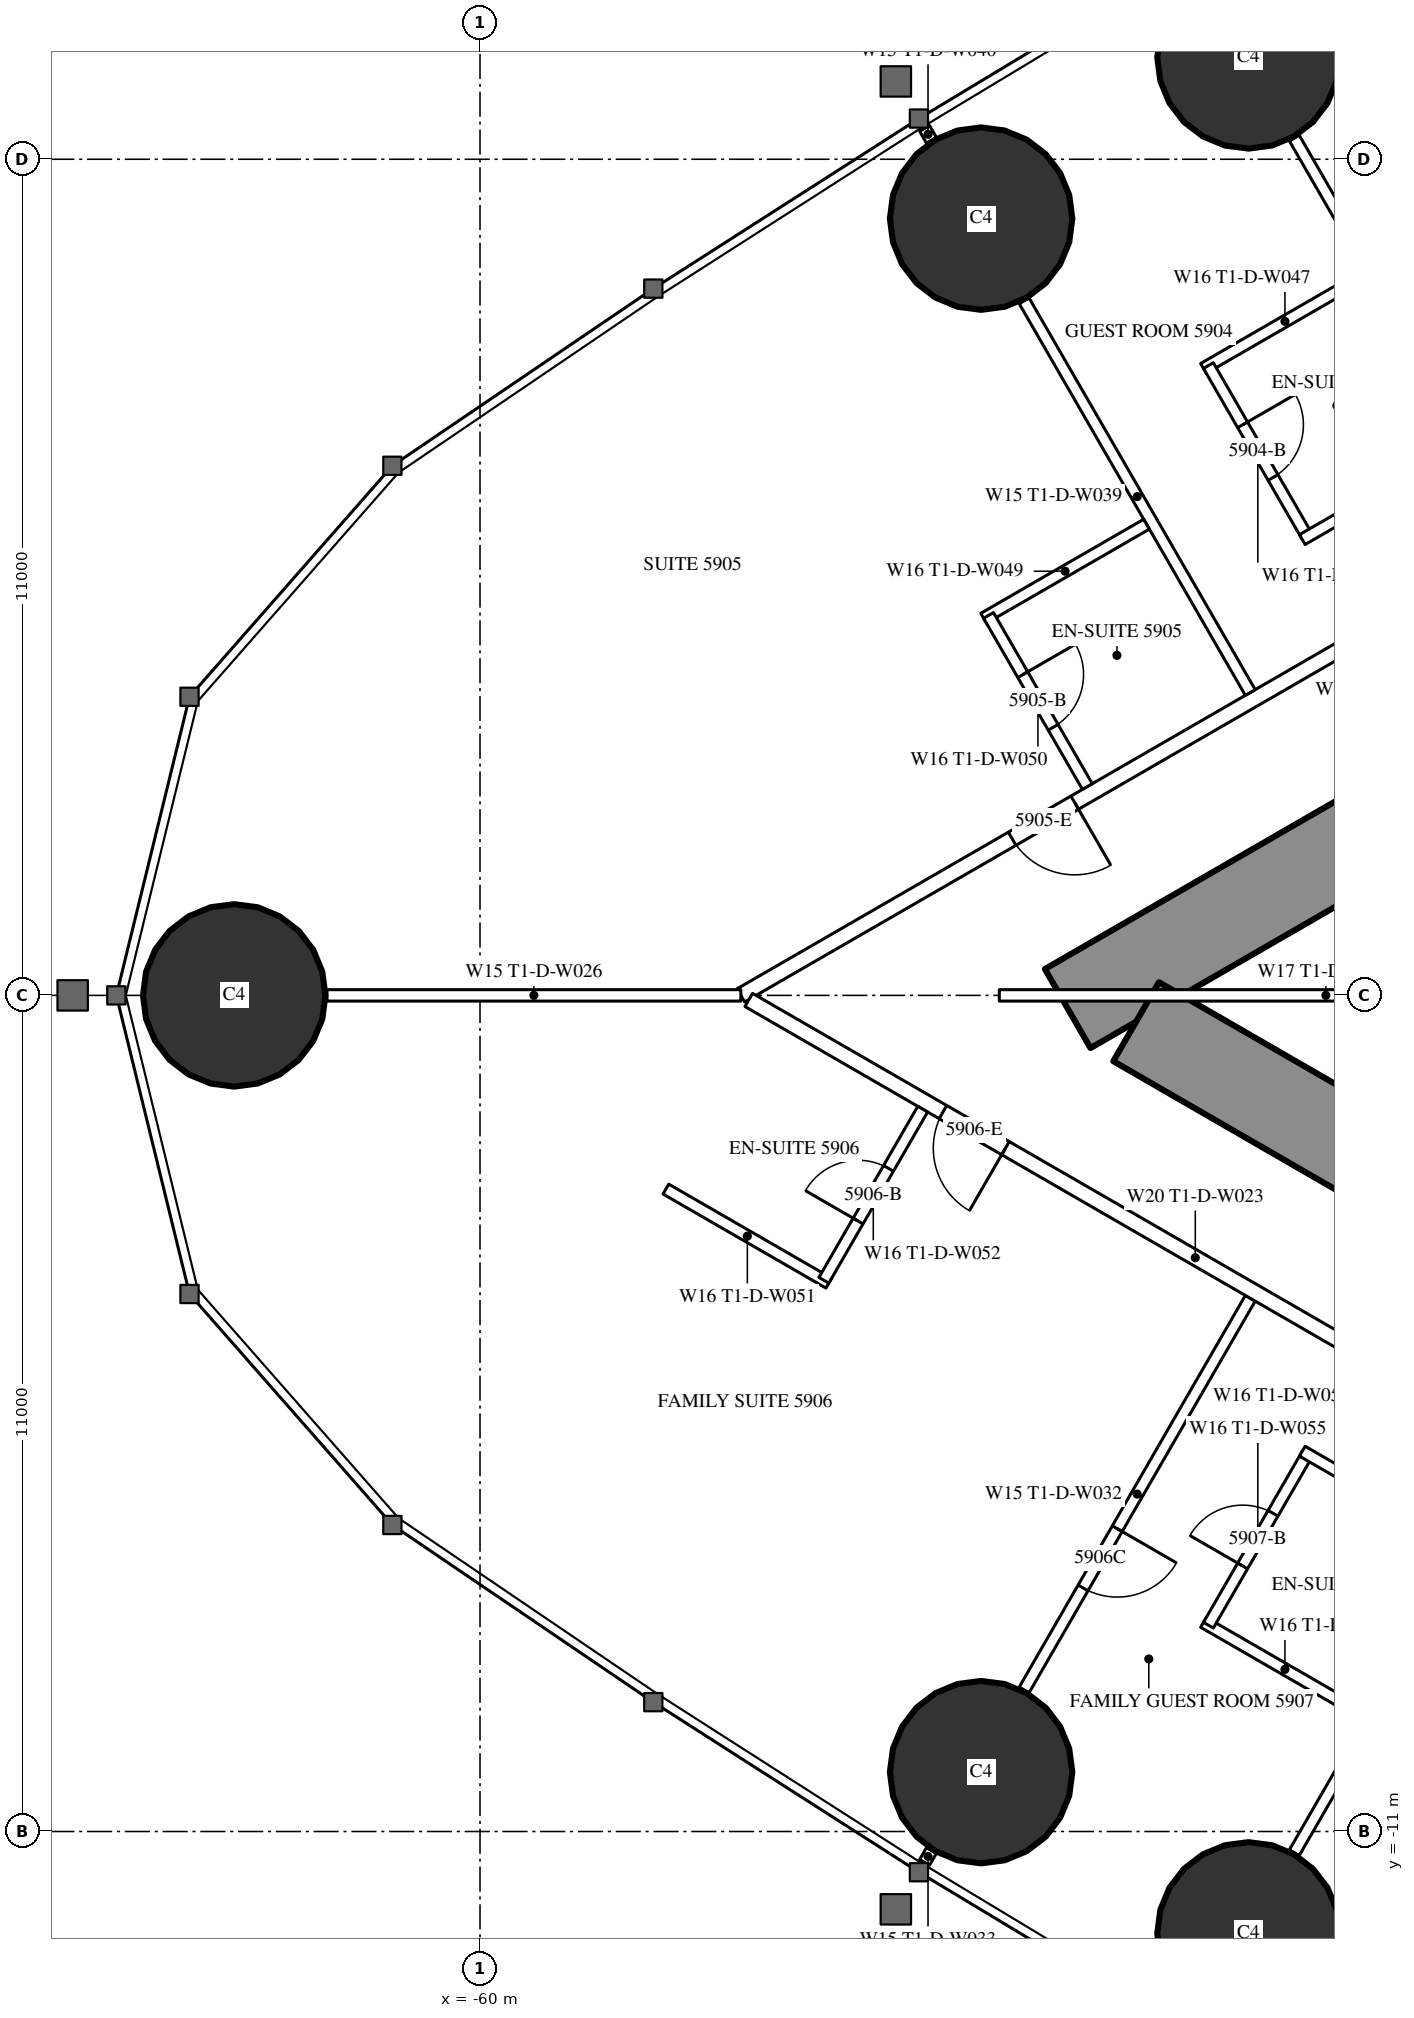
"""IFC4 building model, lengths in metres.
Left out: names, types, materials, properties, quantities, classifications, styles, units other than length and angle.
Written with IfcOpenShell. Run it as: python <this file> out.ifc"""

import sys

from ifc_helpers import new_model, si_unit, direction, frame, frame_2d, origin, origin_2d, place, context, subcontext, project, spatial, rectangle, circle, extrude, element, fill, save


model = new_model("IFC4")
c1 = context("Model", 3, precision=1e-05, world=origin(), true_north=direction((0.0, 1.0)))
c2 = subcontext(c1, "Body", "Model", "MODEL_VIEW")
j1 = project(units=[si_unit("LENGTHUNIT", "METRE"), si_unit("PLANEANGLEUNIT", "RADIAN")], contexts=[c1])
p1 = place(None, origin())
s1 = spatial("IfcSite", under=j1, at=p1, CompositionType="ELEMENT")
p2 = place(p1, origin())
s2 = spatial("IfcBuilding", under=s1, at=p2, CompositionType="ELEMENT")
p3 = place(p2, frame((0.0, 0.0, 222.5)))
s3 = spatial("IfcBuildingStorey", under=s2, at=p3, CompositionType="ELEMENT", Elevation=222.5)
for number, where, z_axis, x_axis in (
    (1, (-63.234, 0.0, 0.0), (0.0, 0.0, 1.0), (1.0, 0.0, 0.0)),
    (2, (-53.408, -10.219, 0.0), (0.0, 0.0, 1.0), (1.0, 0.0, 0.0)),
    (3, (-49.89, -12.34, 0.0), (0.0, 0.0, 1.0), (1.0, 0.0, 0.0)),
    (4, (-49.89, 12.34, 0.0), (0.0, 0.0, 1.0), (1.0, 0.0, 0.0)),
    (5, (-53.408, 10.219, 0.0), (0.0, 0.0, 1.0), (1.0, 0.0, 0.0)),
):
    element("IfcColumn", number, at=place(p3, frame(where, z_axis=z_axis, x_axis=x_axis)), inside=s3, PredefinedType="COLUMN", context=c2, shape_type="SweptSolid", body=[
        extrude(circle(Radius=1.2, at=origin_2d()), origin(), (0.0, 0.0, 1.0), 3.6),
    ])
p4 = place(p3, frame((-27.2, 14.3, 0.0), z_axis=(0.0, 0.0, 1.0), x_axis=(-0.866026593062, -0.499997940104, 0.0)))
e6 = element("IfcWall", 6, at=p4, inside=s3, PredefinedType="SHEAR", context=c2, shape_type="SweptSolid", body=[
    extrude(rectangle(XDim=28.946, YDim=1.2, at=frame_2d((14.473, 0.0))), origin(), (0.0, 0.0, 1.0), 3.6),
])
p5 = place(p4, frame((4.6, 0.0, 0.0)))
e7 = element("IfcOpeningElement", 7, at=p5, cuts=e6, PredefinedType="OPENING", context=c2, shape_type="SweptSolid", body=[
    extrude(rectangle(XDim=1.0, YDim=2.2, at=frame_2d((0.5, 1.1))), frame((0.0, 0.61, 0.0), z_axis=(0.0, -1.0, 0.0), x_axis=(1.0, 0.0, 0.0)), (0.0, 0.0, 1.0), 1.22),
])
p6 = place(p4, frame((13.395, 0.0, 0.0)))
e8 = element("IfcOpeningElement", 8, at=p6, cuts=e6, PredefinedType="OPENING", context=c2, shape_type="SweptSolid", body=[
    extrude(rectangle(XDim=1.8, YDim=2.2, at=frame_2d((0.9, 1.1))), frame((0.0, 0.61, 0.0), z_axis=(0.0, -1.0, 0.0), x_axis=(1.0, 0.0, 0.0)), (0.0, 0.0, 1.0), 1.22),
])
p7 = place(p3, frame((-27.2, -14.3, 0.0), z_axis=(0.0, 0.0, 1.0), x_axis=(-0.866024021859, 0.500002393557, 0.0)))
e9 = element("IfcWall", 9, at=p7, inside=s3, PredefinedType="SHEAR", context=c2, shape_type="SweptSolid", body=[
    extrude(rectangle(XDim=27.907, YDim=1.2, at=frame_2d((13.954, 0.0))), origin(), (0.0, 0.0, 1.0), 3.6),
])
p8 = place(p7, frame((4.6, 0.0, 0.0)))
e10 = element("IfcOpeningElement", 10, at=p8, cuts=e9, PredefinedType="OPENING", context=c2, shape_type="SweptSolid", body=[
    extrude(rectangle(XDim=1.0, YDim=2.2, at=frame_2d((0.5, 1.1))), frame((0.0, 0.61, 0.0), z_axis=(0.0, -1.0, 0.0), x_axis=(1.0, 0.0, 0.0)), (0.0, 0.0, 1.0), 1.22),
])
p9 = place(p7, frame((13.395, 0.0, 0.0)))
e11 = element("IfcOpeningElement", 11, at=p9, cuts=e9, PredefinedType="OPENING", context=c2, shape_type="SweptSolid", body=[
    extrude(rectangle(XDim=1.8, YDim=2.2, at=frame_2d((0.9, 1.1))), frame((0.0, 0.61, 0.0), z_axis=(0.0, -1.0, 0.0), x_axis=(1.0, 0.0, 0.0)), (0.0, 0.0, 1.0), 1.22),
])
p10 = place(p3, frame((-28.737, 16.068, 0.0), z_axis=(0.0, 0.0, 1.0), x_axis=(-0.866026057212, -0.499998868229, 0.0)))
e12 = element("IfcWall", 12, at=p10, inside=s3, PredefinedType="PARTITIONING", context=c2, shape_type="SweptSolid", body=[
    extrude(rectangle(XDim=32.137, YDim=0.2, at=frame_2d((16.068, 0.0))), origin(), (0.0, 0.0, 1.0), 3.35),
])
p11 = place(p10, frame((1.08, 0.0, 0.0)))
e13 = element("IfcOpeningElement", 13, at=p11, cuts=e12, PredefinedType="OPENING", context=c2, shape_type="SweptSolid", body=[
    extrude(rectangle(XDim=1.8, YDim=2.03, at=frame_2d((0.9, 1.015))), frame((0.0, 0.11, 0.0), z_axis=(0.0, -1.0, 0.0), x_axis=(1.0, 0.0, 0.0)), (0.0, 0.0, 1.0), 0.22),
])
p12 = place(p10, frame((6.86, 0.0, 0.0)))
e14 = element("IfcOpeningElement", 14, at=p12, cuts=e12, PredefinedType="OPENING", context=c2, shape_type="SweptSolid", body=[
    extrude(rectangle(XDim=1.0, YDim=2.2, at=frame_2d((0.5, 1.1))), frame((0.0, 0.11, 0.0), z_axis=(0.0, -1.0, 0.0), x_axis=(1.0, 0.0, 0.0)), (0.0, 0.0, 1.0), 0.22),
])
p13 = place(p10, frame((16.418, 0.0, 0.0)))
e15 = element("IfcOpeningElement", 15, at=p13, cuts=e12, PredefinedType="OPENING", context=c2, shape_type="SweptSolid", body=[
    extrude(rectangle(XDim=0.95, YDim=2.2, at=frame_2d((0.475, 1.1))), frame((0.0, 0.11, 0.0), z_axis=(0.0, -1.0, 0.0), x_axis=(1.0, 0.0, 0.0)), (0.0, 0.0, 1.0), 0.22),
])
p14 = place(p10, frame((20.567, 0.0, 0.0)))
e16 = element("IfcOpeningElement", 16, at=p14, cuts=e12, PredefinedType="OPENING", context=c2, shape_type="SweptSolid", body=[
    extrude(rectangle(XDim=0.95, YDim=2.2, at=frame_2d((0.475, 1.1))), frame((0.0, 0.11, 0.0), z_axis=(0.0, -1.0, 0.0), x_axis=(1.0, 0.0, 0.0)), (0.0, 0.0, 1.0), 0.22),
])
p15 = place(p10, frame((27.065, 0.0, 0.0)))
e17 = element("IfcOpeningElement", 17, at=p15, cuts=e12, PredefinedType="OPENING", context=c2, shape_type="SweptSolid", body=[
    extrude(rectangle(XDim=0.95, YDim=2.2, at=frame_2d((0.475, 1.1))), frame((0.0, 0.11, 0.0), z_axis=(0.0, -1.0, 0.0), x_axis=(1.0, 0.0, 0.0)), (0.0, 0.0, 1.0), 0.22),
])
p16 = place(p3, frame((-46.274, 6.059, 0.0), z_axis=(0.0, 0.0, 1.0), x_axis=(-0.500020471368, 0.866013584312, 0.0)))
e18 = element("IfcWall", 18, at=p16, inside=s3, PredefinedType="PARTITIONING", context=c2, shape_type="SweptSolid", body=[
    extrude(rectangle(XDim=6.028, YDim=0.15, at=frame_2d((3.014, 0.0))), origin(), (0.0, 0.0, 1.0), 2.45),
])
p17 = place(p3, frame((-49.866, 3.985, 0.0), z_axis=(0.0, 0.0, 1.0), x_axis=(-0.500000694566, 0.866025002776, 0.0)))
e19 = element("IfcWall", 19, at=p17, inside=s3, PredefinedType="PARTITIONING", context=c2, shape_type="SweptSolid", body=[
    extrude(rectangle(XDim=5.95, YDim=0.15, at=frame_2d((2.975, 0.0))), origin(), (0.0, 0.0, 1.0), 2.45),
])
p18 = place(p3, frame((-54.061, 11.25, 0.0), z_axis=(0.0, 0.0, 1.0), x_axis=(-0.500391173478, 0.865799441849, 0.0)))
e20 = element("IfcWall", 20, at=p18, inside=s3, PredefinedType="PARTITIONING", context=c2, shape_type="SweptSolid", body=[
    extrude(rectangle(XDim=0.179, YDim=0.15, at=frame_2d((0.089, 0.0))), origin(), (0.0, 0.0, 1.0), 2.45),
])
p19 = place(p3, frame((-46.274, -6.059, 0.0), z_axis=(0.0, 0.0, 1.0), x_axis=(-0.500020471368, -0.866013584312, 0.0)))
e21 = element("IfcWall", 21, at=p19, inside=s3, PredefinedType="PARTITIONING", context=c2, shape_type="SweptSolid", body=[
    extrude(rectangle(XDim=6.028, YDim=0.15, at=frame_2d((3.014, 0.0))), origin(), (0.0, 0.0, 1.0), 2.45),
])
p20 = place(p3, frame((-49.866, -3.985, 0.0), z_axis=(0.0, 0.0, 1.0), x_axis=(-0.500000694566, -0.866025002776, 0.0)))
e22 = element("IfcWall", 22, at=p20, inside=s3, PredefinedType="PARTITIONING", context=c2, shape_type="SweptSolid", body=[
    extrude(rectangle(XDim=5.95, YDim=0.15, at=frame_2d((2.975, 0.0))), origin(), (0.0, 0.0, 1.0), 2.45),
])
p21 = place(p20, frame((3.5, 0.0, 0.0)))
e23 = element("IfcOpeningElement", 23, at=p21, cuts=e22, PredefinedType="OPENING", context=c2, shape_type="SweptSolid", body=[
    extrude(rectangle(XDim=0.9, YDim=2.2, at=frame_2d((0.45, 1.1))), frame((0.0, 0.085, 0.0), z_axis=(0.0, -1.0, 0.0), x_axis=(1.0, 0.0, 0.0)), (0.0, 0.0, 1.0), 0.17),
])
p22 = place(p3, frame((-54.061, -11.25, 0.0), z_axis=(0.0, 0.0, 1.0), x_axis=(-0.500391173478, -0.865799441849, 0.0)))
e24 = element("IfcWall", 24, at=p22, inside=s3, PredefinedType="PARTITIONING", context=c2, shape_type="SweptSolid", body=[
    extrude(rectangle(XDim=0.179, YDim=0.15, at=frame_2d((0.089, 0.0))), origin(), (0.0, 0.0, 1.0), 2.45),
])
p23 = place(p3, frame((-56.568, 0.0, 0.0), z_axis=(0.0, 0.0, 1.0), x_axis=(-1.0, 0.0, 0.0)))
e25 = element("IfcWall", 25, at=p23, inside=s3, PredefinedType="PARTITIONING", context=c2, shape_type="SweptSolid", body=[
    extrude(rectangle(XDim=5.446, YDim=0.15, at=frame_2d((2.723, 0.0))), origin(), (0.0, 0.0, 1.0), 2.45),
])
p24 = place(p3, frame((-44.715, -6.844, 0.0), z_axis=(0.0, 0.0, 1.0), x_axis=(-0.866025261224, 0.500000246922, 0.0)))
e26 = element("IfcWall", 26, at=p24, inside=s3, PredefinedType="PARTITIONING", context=c2, shape_type="SweptSolid", body=[
    extrude(rectangle(XDim=13.567, YDim=0.2, at=frame_2d((6.783, 0.0))), origin(), (0.0, 0.0, 1.0), 3.35),
])
p25 = place(p24, frame((9.667, 0.0, 0.0)))
e27 = element("IfcOpeningElement", 27, at=p25, cuts=e26, PredefinedType="OPENING", context=c2, shape_type="SweptSolid", body=[
    extrude(rectangle(XDim=0.95, YDim=2.2, at=frame_2d((0.475, 1.1))), frame((0.0, 0.11, 0.0), z_axis=(0.0, -1.0, 0.0), x_axis=(1.0, 0.0, 0.0)), (0.0, 0.0, 1.0), 0.22),
])
p26 = place(p24, frame((2.117, 0.0, 0.0)))
e28 = element("IfcOpeningElement", 28, at=p26, cuts=e26, PredefinedType="OPENING", context=c2, shape_type="SweptSolid", body=[
    extrude(rectangle(XDim=0.95, YDim=2.2, at=frame_2d((0.475, 1.1))), frame((0.0, 0.11, 0.0), z_axis=(0.0, -1.0, 0.0), x_axis=(1.0, 0.0, 0.0)), (0.0, 0.0, 1.0), 0.22),
])
p27 = place(p24, frame((0.5, 0.0, 0.0)))
e29 = element("IfcOpeningElement", 29, at=p27, cuts=e26, PredefinedType="OPENING", context=c2, shape_type="SweptSolid", body=[
    extrude(rectangle(XDim=0.967, YDim=2.2, at=frame_2d((0.483, 1.1))), frame((0.0, 0.11, 0.0), z_axis=(0.0, -1.0, 0.0), x_axis=(1.0, 0.0, 0.0)), (0.0, 0.0, 1.0), 0.22),
])
p28 = place(p3, frame((-48.339, 9.486, 0.0), z_axis=(0.0, 0.0, 1.0), x_axis=(-0.866006523861, -0.500032699561, 0.0)))
e30 = element("IfcWall", 30, at=p28, inside=s3, PredefinedType="PARTITIONING", context=c2, shape_type="SweptSolid", body=[
    extrude(rectangle(XDim=2.475, YDim=0.15, at=frame_2d((1.237, 0.0))), origin(), (0.0, 0.0, 1.0), 3.35),
])
p29 = place(p3, frame((-49.117, 6.034, 0.0), z_axis=(0.0, 0.0, 1.0), x_axis=(-0.500006934395, 0.866021400173, 0.0)))
e31 = element("IfcWall", 31, at=p29, inside=s3, PredefinedType="PARTITIONING", context=c2, shape_type="SweptSolid", body=[
    extrude(rectangle(XDim=2.6, YDim=0.15, at=frame_2d((1.3, 0.0))), origin(), (0.0, 0.0, 1.0), 3.35),
])
p30 = place(p29, frame((0.9, 0.0, 0.0)))
e32 = element("IfcOpeningElement", 32, at=p30, cuts=e31, PredefinedType="OPENING", context=c2, shape_type="SweptSolid", body=[
    extrude(rectangle(XDim=0.8, YDim=2.2, at=frame_2d((0.4, 1.1))), frame((0.0, 0.085, 0.0), z_axis=(0.0, -1.0, 0.0), x_axis=(1.0, 0.0, 0.0)), (0.0, 0.0, 1.0), 0.17),
])
for number, where, z_axis, x_axis in (
    (33, (-47.039, 7.234, 0.0), (0.0, 0.0, 1.0), (-0.866, -0.5, 0.0)),
    (34, (-51.231, 6.199, 0.0), (0.0, 0.0, 1.0), (-0.866, -0.5, 0.0)),
):
    element("IfcWall", number, at=place(p3, frame(where, z_axis=z_axis, x_axis=x_axis)), inside=s3, PredefinedType="PARTITIONING", context=c2, shape_type="SweptSolid", body=[
        extrude(rectangle(XDim=2.475, YDim=0.15, at=frame_2d((1.238, 0.0))), origin(), (0.0, 0.0, 1.0), 3.35),
    ])
p31 = place(p3, frame((-52.01, 2.747, 0.0), z_axis=(0.0, 0.0, 1.0), x_axis=(-0.500006934395, 0.866021400173, 0.0)))
e35 = element("IfcWall", 35, at=p31, inside=s3, PredefinedType="PARTITIONING", context=c2, shape_type="SweptSolid", body=[
    extrude(rectangle(XDim=2.6, YDim=0.15, at=frame_2d((1.3, 0.0))), origin(), (0.0, 0.0, 1.0), 3.35),
])
p32 = place(p31, frame((0.9, 0.0, 0.0)))
e36 = element("IfcOpeningElement", 36, at=p32, cuts=e35, PredefinedType="OPENING", context=c2, shape_type="SweptSolid", body=[
    extrude(rectangle(XDim=0.8, YDim=2.2, at=frame_2d((0.4, 1.1))), frame((0.0, 0.085, 0.0), z_axis=(0.0, -1.0, 0.0), x_axis=(1.0, 0.0, 0.0)), (0.0, 0.0, 1.0), 0.17),
])
p33 = place(p3, frame((-55.411, -3.786, 0.0), z_axis=(0.0, 0.0, 1.0), x_axis=(-0.866006523861, 0.500032699561, 0.0)))
e37 = element("IfcWall", 37, at=p33, inside=s3, PredefinedType="PARTITIONING", context=c2, shape_type="SweptSolid", body=[
    extrude(rectangle(XDim=2.475, YDim=0.15, at=frame_2d((1.237, 0.0))), origin(), (0.0, 0.0, 1.0), 3.35),
])
p34 = place(p3, frame((-54.176, -1.497, 0.0), z_axis=(0.0, 0.0, 1.0), x_axis=(-0.500006934395, -0.866021400173, 0.0)))
e38 = element("IfcWall", 38, at=p34, inside=s3, PredefinedType="PARTITIONING", context=c2, shape_type="SweptSolid", body=[
    extrude(rectangle(XDim=2.6, YDim=0.15, at=frame_2d((1.3, 0.0))), origin(), (0.0, 0.0, 1.0), 3.35),
])
p35 = place(p34, frame((0.9, 0.0, 0.0)))
e39 = element("IfcOpeningElement", 39, at=p35, cuts=e38, PredefinedType="OPENING", context=c2, shape_type="SweptSolid", body=[
    extrude(rectangle(XDim=0.8, YDim=2.2, at=frame_2d((0.4, 1.1))), frame((0.0, 0.085, 0.0), z_axis=(0.0, -1.0, 0.0), x_axis=(1.0, 0.0, 0.0)), (0.0, 0.0, 1.0), 0.17),
])
p36 = place(p3, frame((-48.339, -9.486, 0.0), z_axis=(0.0, 0.0, 1.0), x_axis=(-0.866006523861, 0.500032699561, 0.0)))
e40 = element("IfcWall", 40, at=p36, inside=s3, PredefinedType="PARTITIONING", context=c2, shape_type="SweptSolid", body=[
    extrude(rectangle(XDim=2.475, YDim=0.15, at=frame_2d((1.237, 0.0))), origin(), (0.0, 0.0, 1.0), 3.35),
])
p37 = place(p3, frame((-49.117, -6.034, 0.0), z_axis=(0.0, 0.0, 1.0), x_axis=(-0.500006934395, -0.866021400173, 0.0)))
e41 = element("IfcWall", 41, at=p37, inside=s3, PredefinedType="PARTITIONING", context=c2, shape_type="SweptSolid", body=[
    extrude(rectangle(XDim=2.6, YDim=0.15, at=frame_2d((1.3, 0.0))), origin(), (0.0, 0.0, 1.0), 3.35),
])
p38 = place(p37, frame((0.9, 0.0, 0.0)))
e42 = element("IfcOpeningElement", 42, at=p38, cuts=e41, PredefinedType="OPENING", context=c2, shape_type="SweptSolid", body=[
    extrude(rectangle(XDim=0.8, YDim=2.2, at=frame_2d((0.4, 1.1))), frame((0.0, 0.085, 0.0), z_axis=(0.0, -1.0, 0.0), x_axis=(1.0, 0.0, 0.0)), (0.0, 0.0, 1.0), 0.17),
])
p39 = place(p3, frame((-47.039, -7.234, 0.0), z_axis=(0.0, 0.0, 1.0), x_axis=(-0.866073894602, 0.499916002032, 0.0)))
e43 = element("IfcWall", 43, at=p39, inside=s3, PredefinedType="PARTITIONING", context=c2, shape_type="SweptSolid", body=[
    extrude(rectangle(XDim=2.475, YDim=0.15, at=frame_2d((1.238, 0.0))), origin(), (0.0, 0.0, 1.0), 2.5),
])
p40 = place(p3, frame((-44.575, 0.0, 0.0), z_axis=(0.0, 0.0, 1.0), x_axis=(-1.0, 0.0, 0.0)))
e44 = element("IfcWall", 44, at=p40, inside=s3, PredefinedType="PARTITIONING", context=c2, shape_type="SweptSolid", body=[
    extrude(rectangle(XDim=8.593, YDim=0.15, at=frame_2d((4.297, 0.0))), origin(), (0.0, 0.0, 1.0), 2.45),
])
p41 = place(p30, origin())
e45 = element("IfcDoor", 45, at=p41, inside=s3, OperationType="SINGLE_SWING_RIGHT", PredefinedType="DOOR", context=c2, shape_type="SweptSolid", body=[
    extrude(rectangle(XDim=0.8, YDim=2.2, at=frame_2d((0.4, 1.1))), frame((0.0, 0.025, 0.0), z_axis=(0.0, -1.0, 0.0), x_axis=(1.0, 0.0, 0.0)), (0.0, 0.0, 1.0), 0.05),
])
fill(e32, e45)
p42 = place(p32, origin())
e46 = element("IfcDoor", 46, at=p42, inside=s3, OperationType="SINGLE_SWING_RIGHT", PredefinedType="DOOR", context=c2, shape_type="SweptSolid", body=[
    extrude(rectangle(XDim=0.8, YDim=2.2, at=frame_2d((0.4, 1.1))), frame((0.0, 0.025, 0.0), z_axis=(0.0, -1.0, 0.0), x_axis=(1.0, 0.0, 0.0)), (0.0, 0.0, 1.0), 0.05),
])
fill(e36, e46)
p43 = place(p15, origin())
e47 = element("IfcDoor", 47, at=p43, inside=s3, OperationType="SINGLE_SWING_LEFT", PredefinedType="DOOR", context=c2, shape_type="SweptSolid", body=[
    extrude(rectangle(XDim=0.95, YDim=2.2, at=frame_2d((0.475, 1.1))), frame((0.0, 0.025, 0.0), z_axis=(0.0, -1.0, 0.0), x_axis=(1.0, 0.0, 0.0)), (0.0, 0.0, 1.0), 0.05),
])
fill(e17, e47)
p44 = place(p35, origin())
e48 = element("IfcDoor", 48, at=p44, inside=s3, OperationType="SINGLE_SWING_RIGHT", PredefinedType="DOOR", context=c2, shape_type="SweptSolid", body=[
    extrude(rectangle(XDim=0.8, YDim=2.2, at=frame_2d((0.4, 1.1))), frame((0.0, 0.025, 0.0), z_axis=(0.0, -1.0, 0.0), x_axis=(1.0, 0.0, 0.0)), (0.0, 0.0, 1.0), 0.05),
])
fill(e39, e48)
p45 = place(p25, origin())
e49 = element("IfcDoor", 49, at=p45, inside=s3, OperationType="SINGLE_SWING_LEFT", PredefinedType="DOOR", context=c2, shape_type="SweptSolid", body=[
    extrude(rectangle(XDim=0.95, YDim=2.2, at=frame_2d((0.475, 1.1))), frame((0.0, 0.025, 0.0), z_axis=(0.0, -1.0, 0.0), x_axis=(1.0, 0.0, 0.0)), (0.0, 0.0, 1.0), 0.05),
])
fill(e27, e49)
p46 = place(p38, origin())
e50 = element("IfcDoor", 50, at=p46, inside=s3, OperationType="SINGLE_SWING_RIGHT", PredefinedType="DOOR", context=c2, shape_type="SweptSolid", body=[
    extrude(rectangle(XDim=0.8, YDim=2.2, at=frame_2d((0.4, 1.1))), frame((0.0, 0.025, 0.0), z_axis=(0.0, -1.0, 0.0), x_axis=(1.0, 0.0, 0.0)), (0.0, 0.0, 1.0), 0.05),
])
fill(e42, e50)
p47 = place(p21, origin())
e51 = element("IfcDoor", 51, at=p47, inside=s3, OperationType="SINGLE_SWING_LEFT", PredefinedType="DOOR", context=c2, shape_type="SweptSolid", body=[
    extrude(rectangle(XDim=0.9, YDim=2.2, at=frame_2d((0.45, 1.1))), frame((0.0, 0.025, 0.0), z_axis=(0.0, -1.0, 0.0), x_axis=(1.0, 0.0, 0.0)), (0.0, 0.0, 1.0), 0.05),
])
fill(e23, e51)
save(model, sys.argv[1])
